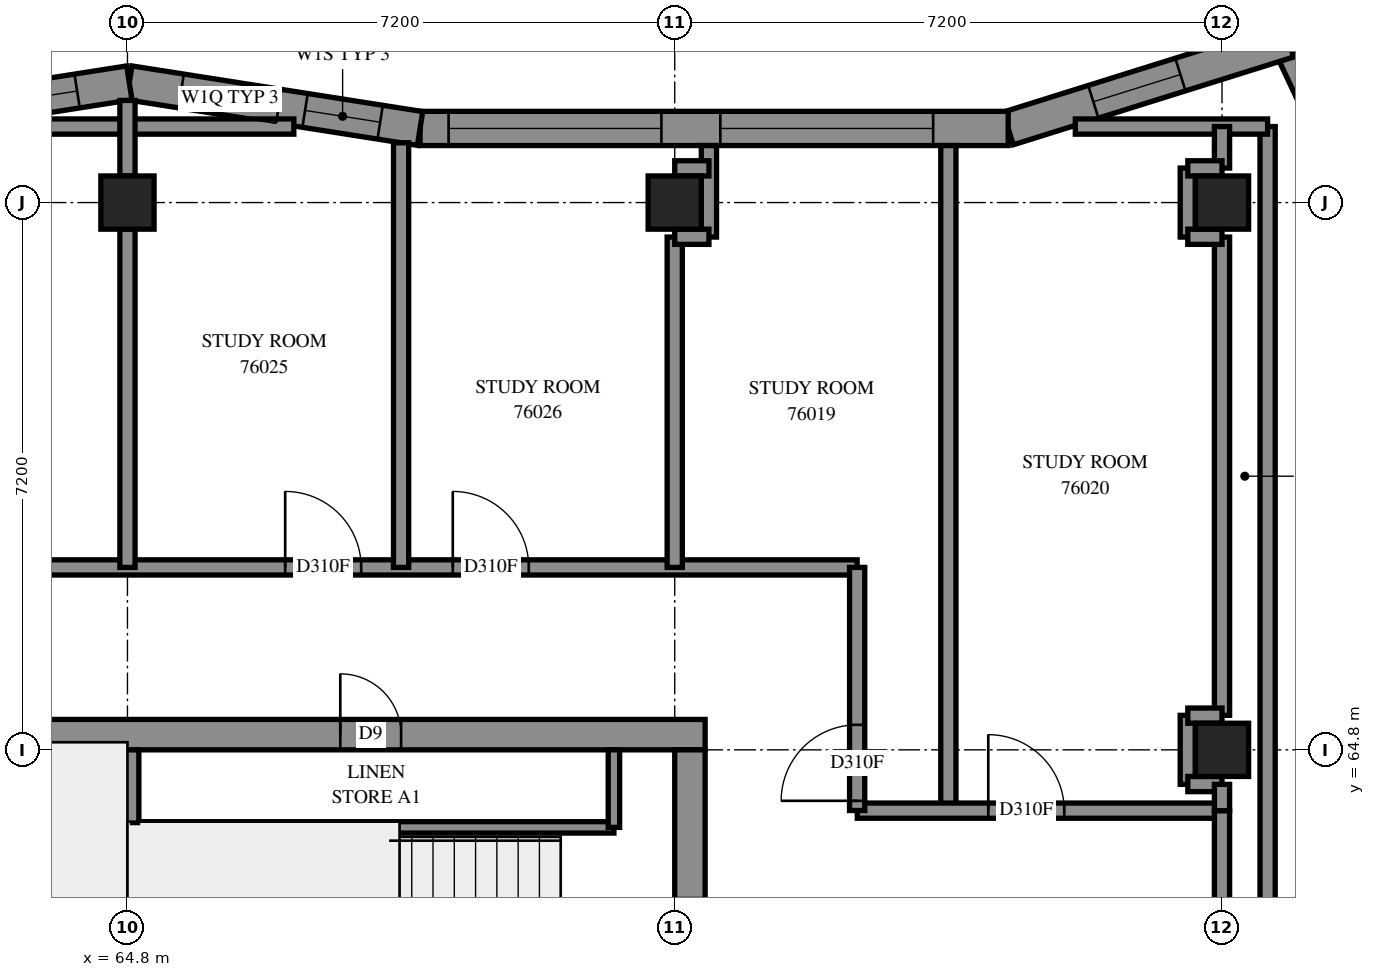
"""IFC4 building model, lengths in metres.
Left out: names, types, materials, properties, quantities, classifications, styles, units other than length and angle.
Written with IfcOpenShell. Run it as: python <this file> out.ifc"""

import sys

from ifc_helpers import new_model, si_unit, direction, frame, frame_2d, origin, origin_2d, place, context, subcontext, project, spatial, polyline, rectangle, outline, extrude, element, fill, save


model = new_model("IFC4")
c1 = context("Model", 3, precision=1e-05, world=origin(), true_north=direction((0.0, 1.0)))
c2 = subcontext(c1, "Body", "Model", "MODEL_VIEW")
j1 = project(units=[si_unit("LENGTHUNIT", "METRE"), si_unit("PLANEANGLEUNIT", "RADIAN")], contexts=[c1])
p1 = place(None, origin())
s1 = spatial("IfcSite", under=j1, at=p1, CompositionType="ELEMENT")
p2 = place(p1, origin())
s2 = spatial("IfcBuilding", under=s1, at=p2, CompositionType="ELEMENT")
p3 = place(p2, frame((0.0, 0.0, 277.8)))
s3 = spatial("IfcBuildingStorey", under=s2, at=p3, CompositionType="ELEMENT", Elevation=277.8)
for number, where, z_axis, x_axis in (
    (1, (64.8, 72.0, 0.0), (0.0, 0.0, 1.0), (1.0, 0.0, 0.0)),
    (2, (72.0, 72.0, 0.0), (0.0, 0.0, 1.0), (1.0, 0.0, 0.0)),
    (3, (79.2, 64.8, 0.0), (0.0, 0.0, 1.0), (1.0, 0.0, 0.0)),
    (4, (79.2, 72.0, 0.0), (0.0, 0.0, 1.0), (1.0, 0.0, 0.0)),
):
    element("IfcColumn", number, at=place(p3, frame(where, z_axis=z_axis, x_axis=x_axis)), inside=s3, PredefinedType="COLUMN", context=c2, shape_type="SweptSolid", body=[
        extrude(rectangle(XDim=0.7, YDim=0.7, at=origin_2d()), origin(), (0.0, 0.0, 1.0), 3.1),
    ])
p4 = place(p3, frame((57.2, 65.0, -0.3), z_axis=(0.0, 0.0, 1.0), x_axis=(1.0, 0.0, 0.0)))
e5 = element("IfcWall", 5, at=p4, inside=s3, PredefinedType="SHEAR", context=c2, shape_type="SweptSolid", body=[
    extrude(rectangle(XDim=15.2, YDim=0.4, at=frame_2d((7.6, 0.0))), origin(), (0.0, 0.0, 1.0), 2.7),
])
p5 = place(p4, frame((10.4, 0.0, 0.3)))
e6 = element("IfcOpeningElement", 6, at=p5, cuts=e5, PredefinedType="OPENING", context=c2, shape_type="SweptSolid", body=[
    extrude(rectangle(XDim=0.8, YDim=2.1, at=frame_2d((0.4, 1.05))), frame((0.0, 0.21, 0.0), z_axis=(0.0, -1.0, 0.0), x_axis=(1.0, 0.0, 0.0)), (0.0, 0.0, 1.0), 0.42),
])
p6 = place(p3, frame((72.2, 50.4, -0.3), z_axis=(0.0, 0.0, 1.0), x_axis=(0.0, 1.0, 0.0)))
e7 = element("IfcWall", 7, at=p6, inside=s3, PredefinedType="SHEAR", context=c2, shape_type="SweptSolid", body=[
    extrude(rectangle(XDim=14.4, YDim=0.4, at=frame_2d((7.2, 0.0))), origin(), (0.0, 0.0, 1.0), 2.7),
])
p7 = place(p6, frame((4.55, 0.0, 0.3)))
e8 = element("IfcOpeningElement", 8, at=p7, cuts=e7, PredefinedType="OPENING", context=c2, shape_type="SweptSolid", body=[
    extrude(rectangle(XDim=1.1, YDim=2.1, at=frame_2d((0.55, 1.05))), frame((0.0, 0.21, 0.0), z_axis=(0.0, -1.0, 0.0), x_axis=(1.0, 0.0, 0.0)), (0.0, 0.0, 1.0), 0.42),
])
p8 = place(p6, frame((11.35, 0.0, 0.3)))
e9 = element("IfcOpeningElement", 9, at=p8, cuts=e7, PredefinedType="OPENING", context=c2, shape_type="SweptSolid", body=[
    extrude(rectangle(XDim=1.1, YDim=2.1, at=frame_2d((0.55, 1.05))), frame((0.0, 0.21, 0.0), z_axis=(0.0, -1.0, 0.0), x_axis=(1.0, 0.0, 0.0)), (0.0, 0.0, 1.0), 0.42),
])
p9 = place(p3, frame((64.8, 60.6, 0.0), z_axis=(0.0, 0.0, 1.0), x_axis=(0.0, 1.0, 0.0)))
e10 = element("IfcWall", 10, at=p9, inside=s3, PredefinedType="SOLIDWALL", context=c2, shape_type="SweptSolid", body=[
    extrude(rectangle(XDim=4.2, YDim=0.3, at=frame_2d((2.1, 0.0))), origin(), (0.0, 0.0, 1.0), 3.1),
])
p10 = place(p3, frame((81.528, 71.04, 0.0), z_axis=(0.0, 0.0, 1.0), x_axis=(-0.4256305639, 0.9048970234, 0.0)))
e11 = element("IfcWall", 11, at=p10, inside=s3, PredefinedType="SOLIDWALL", context=c2, shape_type="SweptSolid", body=[
    extrude(outline(polyline([(0.06, -0.225), (3.61, -0.225), (3.217, 0.225), (-0.06, 0.225), (0.06, -0.225)])), origin(), (0.0, 0.0, 1.0), 3.1),
])
p11 = place(p10, frame((0.736, 0.0, 0.45)))
e12 = element("IfcOpeningElement", 12, at=p11, cuts=e11, PredefinedType="OPENING", context=c2, shape_type="SweptSolid", body=[
    extrude(rectangle(XDim=1.2, YDim=2.55, at=frame_2d((0.6, 1.275))), frame((0.0, 0.235, 0.0), z_axis=(0.0, -1.0, 0.0), x_axis=(1.0, 0.0, 0.0)), (0.0, 0.0, 1.0), 0.47),
])
p12 = place(p3, frame((80.075, 74.13, 0.0), z_axis=(0.0, 0.0, 1.0), x_axis=(-0.9543297625, -0.2987552583, 0.0)))
e13 = element("IfcWall", 13, at=p12, inside=s3, PredefinedType="SOLIDWALL", context=c2, shape_type="SweptSolid", body=[
    extrude(outline(polyline([(-0.196, -0.225), (3.83, -0.225), (3.899, 0.225), (0.196, 0.225), (-0.196, -0.225)])), origin(), (0.0, 0.0, 1.0), 3.1),
])
p13 = place(p12, frame((1.491, 0.0, 0.45)))
e14 = element("IfcOpeningElement", 14, at=p13, cuts=e13, PredefinedType="OPENING", context=c2, shape_type="SweptSolid", body=[
    extrude(rectangle(XDim=1.2, YDim=2.55, at=frame_2d((0.6, 1.275))), frame((0.0, 0.235, 0.0), z_axis=(0.0, -1.0, 0.0), x_axis=(1.0, 0.0, 0.0)), (0.0, 0.0, 1.0), 0.47),
])
p14 = place(p3, frame((76.387, 72.975, 0.0), z_axis=(0.0, 0.0, 1.0), x_axis=(-1.0, 0.0, 0.0)))
e15 = element("IfcWall", 15, at=p14, inside=s3, PredefinedType="SOLIDWALL", context=c2, shape_type="SweptSolid", body=[
    extrude(outline(polyline([(0.034, -0.225), (7.72, -0.225), (7.755, 0.225), (-0.034, 0.225), (0.034, -0.225)])), origin(), (0.0, 0.0, 1.0), 3.1),
])
p15 = place(p14, frame((0.987, 0.0, 0.45)))
e16 = element("IfcOpeningElement", 16, at=p15, cuts=e15, PredefinedType="OPENING", context=c2, shape_type="SweptSolid", body=[
    extrude(rectangle(XDim=2.8, YDim=2.55, at=frame_2d((1.4, 1.275))), frame((0.0, 0.235, 0.0), z_axis=(0.0, -1.0, 0.0), x_axis=(1.0, 0.0, 0.0)), (0.0, 0.0, 1.0), 0.47),
])
p16 = place(p14, frame((4.562, 0.0, 0.45)))
e17 = element("IfcOpeningElement", 17, at=p16, cuts=e15, PredefinedType="OPENING", context=c2, shape_type="SweptSolid", body=[
    extrude(rectangle(XDim=2.8, YDim=2.55, at=frame_2d((1.4, 1.275))), frame((0.0, 0.235, 0.0), z_axis=(0.0, -1.0, 0.0), x_axis=(1.0, 0.0, 0.0)), (0.0, 0.0, 1.0), 0.47),
])
p17 = place(p3, frame((68.65, 72.975, 0.0), z_axis=(0.0, 0.0, 1.0), x_axis=(-0.9879128581, 0.1550102733, 0.0)))
e18 = element("IfcWall", 18, at=p17, inside=s3, PredefinedType="SOLIDWALL", context=c2, shape_type="SweptSolid", body=[
    extrude(outline(polyline([(0.018, -0.225), (3.907, -0.225), (3.837, 0.225), (-0.018, 0.225), (0.018, -0.225)])), origin(), (0.0, 0.0, 1.0), 3.1),
])
p18 = place(p17, frame((0.531, 0.0, 0.45)))
e19 = element("IfcOpeningElement", 19, at=p18, cuts=e18, PredefinedType="OPENING", context=c2, shape_type="SweptSolid", body=[
    extrude(rectangle(XDim=1.0, YDim=2.5, at=frame_2d((0.5, 1.25))), frame((0.0, 0.235, 0.0), z_axis=(0.0, -1.0, 0.0), x_axis=(1.0, 0.0, 0.0)), (0.0, 0.0, 1.0), 0.47),
])
p19 = place(p17, frame((1.881, 0.0, 0.45)))
e20 = element("IfcOpeningElement", 20, at=p19, cuts=e18, PredefinedType="OPENING", context=c2, shape_type="SweptSolid", body=[
    extrude(rectangle(XDim=1.3, YDim=2.5, at=frame_2d((0.65, 1.25))), frame((0.0, 0.235, 0.0), z_axis=(0.0, -1.0, 0.0), x_axis=(1.0, 0.0, 0.0)), (0.0, 0.0, 1.0), 0.47),
])
p20 = place(p3, frame((64.824, 73.575, 0.0), z_axis=(0.0, 0.0, 1.0), x_axis=(-0.9879107269, -0.1550238552, 0.0)))
e21 = element("IfcWall", 21, at=p20, inside=s3, PredefinedType="SOLIDWALL", context=c2, shape_type="SweptSolid", body=[
    extrude(outline(polyline([(-0.035, -0.225), (3.854, -0.225), (3.925, 0.225), (0.035, 0.225), (-0.035, -0.225)])), origin(), (0.0, 0.0, 1.0), 3.1),
])
p21 = place(p20, frame((0.695, 0.0, 0.45)))
e22 = element("IfcOpeningElement", 22, at=p21, cuts=e21, PredefinedType="OPENING", context=c2, shape_type="SweptSolid", body=[
    extrude(rectangle(XDim=1.3, YDim=2.5, at=frame_2d((0.65, 1.25))), frame((0.0, 0.235, 0.0), z_axis=(0.0, -1.0, 0.0), x_axis=(1.0, 0.0, 0.0)), (0.0, 0.0, 1.0), 0.47),
])
p22 = place(p20, frame((2.345, 0.0, 0.45)))
e23 = element("IfcOpeningElement", 23, at=p22, cuts=e21, PredefinedType="OPENING", context=c2, shape_type="SweptSolid", body=[
    extrude(rectangle(XDim=1.0, YDim=2.5, at=frame_2d((0.5, 1.25))), frame((0.0, 0.235, 0.0), z_axis=(0.0, -1.0, 0.0), x_axis=(1.0, 0.0, 0.0)), (0.0, 0.0, 1.0), 0.47),
])
p23 = place(p3, frame((64.95, 63.78, 0.0), z_axis=(0.0, 0.0, 1.0), x_axis=(1.0, 0.0, 0.0)))
e24 = element("IfcWall", 24, at=p23, inside=s3, PredefinedType="PARTITIONING", context=c2, shape_type="SweptSolid", body=[
    extrude(rectangle(XDim=6.25, YDim=0.15, at=frame_2d((3.125, 0.0))), origin(), (0.0, 0.0, 1.0), 3.1),
])
p24 = place(p3, frame((71.2, 63.78, 0.0), z_axis=(0.0, 0.0, 1.0), x_axis=(0.0, 1.0, 0.0)))
e25 = element("IfcWall", 25, at=p24, inside=s3, PredefinedType="PARTITIONING", context=c2, shape_type="SweptSolid", body=[
    extrude(rectangle(XDim=1.02, YDim=0.15, at=frame_2d((0.51, 0.0))), origin(), (0.0, 0.0, 1.0), 3.1),
])
p25 = place(p3, frame((55.2, 67.2, 0.0), z_axis=(0.0, 0.0, 1.0), x_axis=(1.0, 0.0, 0.0)))
e26 = element("IfcWall", 26, at=p25, inside=s3, PredefinedType="PARTITIONING", context=c2, shape_type="SweptSolid", body=[
    extrude(rectangle(XDim=19.2, YDim=0.2, at=frame_2d((9.6, 0.0))), origin(), (0.0, 0.0, 1.0), 3.1),
])
p26 = place(p25, frame((6.261, 0.0, 0.0)))
e27 = element("IfcOpeningElement", 27, at=p26, cuts=e26, PredefinedType="OPENING", context=c2, shape_type="SweptSolid", body=[
    extrude(rectangle(XDim=0.9, YDim=2.1, at=frame_2d((0.45, 1.05))), frame((0.0, 0.11, 0.0), z_axis=(0.0, -1.0, 0.0), x_axis=(1.0, 0.0, 0.0)), (0.0, 0.0, 1.0), 0.22),
])
p27 = place(p25, frame((11.675, 0.0, 0.0)))
e28 = element("IfcOpeningElement", 28, at=p27, cuts=e26, PredefinedType="OPENING", context=c2, shape_type="SweptSolid", body=[
    extrude(rectangle(XDim=1.0, YDim=2.1, at=frame_2d((0.5, 1.05))), frame((0.0, 0.11, 0.0), z_axis=(0.0, -1.0, 0.0), x_axis=(1.0, 0.0, 0.0)), (0.0, 0.0, 1.0), 0.22),
])
p28 = place(p25, frame((13.88, 0.0, 0.0)))
e29 = element("IfcOpeningElement", 29, at=p28, cuts=e26, PredefinedType="OPENING", context=c2, shape_type="SweptSolid", body=[
    extrude(rectangle(XDim=1.0, YDim=2.1, at=frame_2d((0.5, 1.05))), frame((0.0, 0.11, 0.0), z_axis=(0.0, -1.0, 0.0), x_axis=(1.0, 0.0, 0.0)), (0.0, 0.0, 1.0), 0.22),
])
p29 = place(p3, frame((79.8, 59.2, 0.0), z_axis=(0.0, 0.0, 1.0), x_axis=(0.0, 1.0, 0.0)))
e30 = element("IfcWall", 30, at=p29, inside=s3, PredefinedType="PARTITIONING", context=c2, shape_type="SweptSolid", body=[
    extrude(rectangle(XDim=13.8, YDim=0.2, at=frame_2d((6.9, 0.0))), origin(), (0.0, 0.0, 1.0), 3.1),
])
p30 = place(p3, frame((75.6, 64.0, 0.0), z_axis=(0.0, 0.0, 1.0), x_axis=(0.0, 1.0, 0.0)))
e31 = element("IfcWall", 31, at=p30, inside=s3, PredefinedType="PARTITIONING", context=c2, shape_type="SweptSolid", body=[
    extrude(rectangle(XDim=8.75, YDim=0.2, at=frame_2d((4.375, 0.0))), origin(), (0.0, 0.0, 1.0), 3.1),
])
p31 = place(p3, frame((79.2, 65.254, 0.0), z_axis=(0.0, 0.0, 1.0), x_axis=(0.0, 1.0, 0.0)))
e32 = element("IfcWall", 32, at=p31, inside=s3, PredefinedType="PARTITIONING", context=c2, shape_type="SweptSolid", body=[
    extrude(rectangle(XDim=6.292, YDim=0.2, at=frame_2d((3.146, 0.0))), origin(), (0.0, 0.0, 1.0), 3.1),
])
p32 = place(p3, frame((68.4, 67.2, 0.0), z_axis=(0.0, 0.0, 1.0), x_axis=(0.0, 1.0, 0.0)))
e33 = element("IfcWall", 33, at=p32, inside=s3, PredefinedType="PARTITIONING", context=c2, shape_type="SweptSolid", body=[
    extrude(rectangle(XDim=5.586, YDim=0.2, at=frame_2d((2.793, 0.0))), origin(), (0.0, 0.0, 1.0), 3.1),
])
p33 = place(p3, frame((74.402, 64.0, 0.0), z_axis=(0.0, 0.0, 1.0), x_axis=(1.0, 0.0, 0.0)))
e34 = element("IfcWall", 34, at=p33, inside=s3, PredefinedType="PARTITIONING", context=c2, shape_type="SweptSolid", body=[
    extrude(rectangle(XDim=4.798, YDim=0.2, at=frame_2d((2.399, 0.0))), origin(), (0.0, 0.0, 1.0), 3.1),
])
p34 = place(p33, frame((1.723, 0.0, 0.0)))
e35 = element("IfcOpeningElement", 35, at=p34, cuts=e34, PredefinedType="OPENING", context=c2, shape_type="SweptSolid", body=[
    extrude(rectangle(XDim=1.0, YDim=2.1, at=frame_2d((0.5, 1.05))), frame((0.0, 0.11, 0.0), z_axis=(0.0, -1.0, 0.0), x_axis=(1.0, 0.0, 0.0)), (0.0, 0.0, 1.0), 0.22),
])
p35 = place(p3, frame((64.8, 67.2, 0.0), z_axis=(0.0, 0.0, 1.0), x_axis=(0.0, 1.0, 0.0)))
e36 = element("IfcWall", 36, at=p35, inside=s3, PredefinedType="PARTITIONING", context=c2, shape_type="SweptSolid", body=[
    extrude(rectangle(XDim=4.45, YDim=0.2, at=frame_2d((2.225, 0.0))), origin(), (0.0, 0.0, 1.0), 3.1),
])
p36 = place(p3, frame((72.0, 67.2, 0.0), z_axis=(0.0, 0.0, 1.0), x_axis=(0.0, 1.0, 0.0)))
e37 = element("IfcWall", 37, at=p36, inside=s3, PredefinedType="PARTITIONING", context=c2, shape_type="SweptSolid", body=[
    extrude(rectangle(XDim=4.346, YDim=0.2, at=frame_2d((2.173, 0.0))), origin(), (0.0, 0.0, 1.0), 3.1),
])
p37 = place(p3, frame((62.66, 73.0, 0.0), z_axis=(0.0, 0.0, 1.0), x_axis=(1.0, 0.0, 0.0)))
e38 = element("IfcWall", 38, at=p37, inside=s3, PredefinedType="PARTITIONING", context=c2, shape_type="SweptSolid", body=[
    extrude(rectangle(XDim=4.329, YDim=0.2, at=frame_2d((2.164, 0.0))), origin(), (0.0, 0.0, 1.0), 3.1),
])
p38 = place(p3, frame((74.4, 64.002, 0.0), z_axis=(0.0, 0.0, 1.0), x_axis=(0.0, 1.0, 0.0)))
e39 = element("IfcWall", 39, at=p38, inside=s3, PredefinedType="PARTITIONING", context=c2, shape_type="SweptSolid", body=[
    extrude(rectangle(XDim=3.198, YDim=0.2, at=frame_2d((1.599, 0.0))), origin(), (0.0, 0.0, 1.0), 3.1),
])
p39 = place(p38, frame((0.127, 0.0, 0.0)))
e40 = element("IfcOpeningElement", 40, at=p39, cuts=e39, PredefinedType="OPENING", context=c2, shape_type="SweptSolid", body=[
    extrude(rectangle(XDim=1.0, YDim=2.1, at=frame_2d((0.5, 1.05))), frame((0.0, 0.11, 0.0), z_axis=(0.0, -1.0, 0.0), x_axis=(1.0, 0.0, 0.0)), (0.0, 0.0, 1.0), 0.22),
])
p40 = place(p3, frame((77.27, 73.0, 0.0), z_axis=(0.0, 0.0, 1.0), x_axis=(1.0, 0.0, 0.0)))
e41 = element("IfcWall", 41, at=p40, inside=s3, PredefinedType="PARTITIONING", context=c2, shape_type="SweptSolid", body=[
    extrude(rectangle(XDim=2.53, YDim=0.2, at=frame_2d((1.265, 0.0))), origin(), (0.0, 0.0, 1.0), 3.1),
])
p41 = place(p3, frame((79.2, 62.0, 0.0), z_axis=(0.0, 0.0, 1.0), x_axis=(0.0, 1.0, 0.0)))
e42 = element("IfcWall", 42, at=p41, inside=s3, PredefinedType="PARTITIONING", context=c2, shape_type="SweptSolid", body=[
    extrude(rectangle(XDim=2.0, YDim=0.2, at=frame_2d((1.0, 0.0))), origin(), (0.0, 0.0, 1.0), 3.1),
])
p42 = place(p3, frame((78.75, 64.346, 0.0), z_axis=(0.0, 0.0, 1.0), x_axis=(0.0, 1.0, 0.0)))
e43 = element("IfcWall", 43, at=p42, inside=s3, PredefinedType="PARTITIONING", context=c2, shape_type="SweptSolid", body=[
    extrude(rectangle(XDim=0.908, YDim=0.2, at=frame_2d((0.454, 0.0))), origin(), (0.0, 0.0, 1.0), 3.1),
])
p43 = place(p3, frame((72.45, 71.546, 0.0), z_axis=(0.0, 0.0, 1.0), x_axis=(0.0, 1.0, 0.0)))
e44 = element("IfcWall", 44, at=p43, inside=s3, PredefinedType="PARTITIONING", context=c2, shape_type="SweptSolid", body=[
    extrude(rectangle(XDim=1.204, YDim=0.2, at=frame_2d((0.602, 0.0))), origin(), (0.0, 0.0, 1.0), 3.1),
])
p44 = place(p3, frame((78.75, 71.546, 0.0), z_axis=(0.0, 0.0, 1.0), x_axis=(0.0, 1.0, 0.0)))
e45 = element("IfcWall", 45, at=p44, inside=s3, PredefinedType="PARTITIONING", context=c2, shape_type="SweptSolid", body=[
    extrude(rectangle(XDim=0.908, YDim=0.2, at=frame_2d((0.454, 0.0))), origin(), (0.0, 0.0, 1.0), 3.1),
])
p45 = place(p3, frame((64.8, 72.35, 0.0), z_axis=(0.0, 0.0, 1.0), x_axis=(0.0, 1.0, 0.0)))
e46 = element("IfcWall", 46, at=p45, inside=s3, PredefinedType="PARTITIONING", context=c2, shape_type="SweptSolid", body=[
    extrude(rectangle(XDim=0.994, YDim=0.2, at=frame_2d((0.497, 0.0))), origin(), (0.0, 0.0, 1.0), 3.1),
])
p46 = place(p3, frame((79.2, 72.454, 0.0), z_axis=(0.0, 0.0, 1.0), x_axis=(0.0, 1.0, 0.0)))
e47 = element("IfcWall", 47, at=p46, inside=s3, PredefinedType="PARTITIONING", context=c2, shape_type="SweptSolid", body=[
    extrude(rectangle(XDim=0.546, YDim=0.2, at=frame_2d((0.273, 0.0))), origin(), (0.0, 0.0, 1.0), 3.1),
])
for number, where, z_axis, x_axis in (
    (48, (72.0, 71.55, 0.0), (0.0, 0.0, 1.0), (1.0, 0.0, 0.0)),
    (49, (78.75, 71.55, 0.0), (0.0, 0.0, 1.0), (1.0, 0.0, 0.0)),
    (50, (72.0, 72.45, 0.0), (0.0, 0.0, 1.0), (1.0, 0.0, 0.0)),
    (51, (78.75, 72.45, 0.0), (0.0, 0.0, 1.0), (1.0, 0.0, 0.0)),
    (52, (78.75, 65.25, 0.0), (0.0, 0.0, 1.0), (1.0, 0.0, 0.0)),
    (53, (78.75, 64.35, 0.0), (0.0, 0.0, 1.0), (1.0, 0.0, 0.0)),
):
    element("IfcWall", number, at=place(p3, frame(where, z_axis=z_axis, x_axis=x_axis)), inside=s3, PredefinedType="PARTITIONING", context=c2, shape_type="SweptSolid", body=[
        extrude(rectangle(XDim=0.45, YDim=0.2, at=frame_2d((0.225, 0.0))), origin(), (0.0, 0.0, 1.0), 3.1),
    ])
p47 = place(p3, frame((79.2, 64.0, 0.0), z_axis=(0.0, 0.0, 1.0), x_axis=(0.0, 1.0, 0.0)))
e54 = element("IfcWall", 54, at=p47, inside=s3, PredefinedType="PARTITIONING", context=c2, shape_type="SweptSolid", body=[
    extrude(rectangle(XDim=0.346, YDim=0.2, at=frame_2d((0.173, 0.0))), origin(), (0.0, 0.0, 1.0), 3.1),
])
p48 = place(p13, origin())
e55 = element("IfcWindow", 55, at=p48, inside=s3, PartitioningType="SINGLE_PANEL", PredefinedType="WINDOW", context=c2, shape_type="SweptSolid", body=[
    extrude(rectangle(XDim=1.2, YDim=2.55, at=frame_2d((0.6, 1.275))), frame((0.0, 0.205, 0.0), z_axis=(0.0, -1.0, 0.0), x_axis=(1.0, 0.0, 0.0)), (0.0, 0.0, 1.0), 0.06),
])
fill(e14, e55)
p49 = place(p15, origin())
e56 = element("IfcWindow", 56, at=p49, inside=s3, PartitioningType="SINGLE_PANEL", PredefinedType="WINDOW", context=c2, shape_type="SweptSolid", body=[
    extrude(rectangle(XDim=2.8, YDim=2.55, at=frame_2d((1.4, 1.275))), frame((0.0, 0.205, 0.0), z_axis=(0.0, -1.0, 0.0), x_axis=(1.0, 0.0, 0.0)), (0.0, 0.0, 1.0), 0.06),
])
fill(e16, e56)
p50 = place(p16, origin())
e57 = element("IfcWindow", 57, at=p50, inside=s3, PartitioningType="SINGLE_PANEL", PredefinedType="WINDOW", context=c2, shape_type="SweptSolid", body=[
    extrude(rectangle(XDim=2.8, YDim=2.55, at=frame_2d((1.4, 1.275))), frame((0.0, 0.205, 0.0), z_axis=(0.0, -1.0, 0.0), x_axis=(1.0, 0.0, 0.0)), (0.0, 0.0, 1.0), 0.06),
])
fill(e17, e57)
p51 = place(p5, origin())
e58 = element("IfcDoor", 58, at=p51, inside=s3, OperationType="SINGLE_SWING_RIGHT", PredefinedType="DOOR", context=c2, shape_type="SweptSolid", body=[
    extrude(rectangle(XDim=0.8, YDim=2.1, at=frame_2d((0.4, 1.05))), frame((0.0, 0.025, 0.0), z_axis=(0.0, -1.0, 0.0), x_axis=(1.0, 0.0, 0.0)), (0.0, 0.0, 1.0), 0.05),
])
fill(e6, e58)
p52 = place(p39, origin())
e59 = element("IfcDoor", 59, at=p52, inside=s3, OperationType="SINGLE_SWING_RIGHT", PredefinedType="DOOR", context=c2, shape_type="SweptSolid", body=[
    extrude(rectangle(XDim=1.0, YDim=2.1, at=frame_2d((0.5, 1.05))), frame((0.0, 0.025, 0.0), z_axis=(0.0, -1.0, 0.0), x_axis=(1.0, 0.0, 0.0)), (0.0, 0.0, 1.0), 0.05),
])
fill(e40, e59)
p53 = place(p34, origin())
e60 = element("IfcDoor", 60, at=p53, inside=s3, OperationType="SINGLE_SWING_LEFT", PredefinedType="DOOR", context=c2, shape_type="SweptSolid", body=[
    extrude(rectangle(XDim=1.0, YDim=2.1, at=frame_2d((0.5, 1.05))), frame((0.0, 0.025, 0.0), z_axis=(0.0, -1.0, 0.0), x_axis=(1.0, 0.0, 0.0)), (0.0, 0.0, 1.0), 0.05),
])
fill(e35, e60)
p54 = place(p27, origin())
e61 = element("IfcDoor", 61, at=p54, inside=s3, OperationType="SINGLE_SWING_RIGHT", PredefinedType="DOOR", context=c2, shape_type="SweptSolid", body=[
    extrude(rectangle(XDim=1.0, YDim=2.1, at=frame_2d((0.5, 1.05))), frame((0.0, 0.025, 0.0), z_axis=(0.0, -1.0, 0.0), x_axis=(1.0, 0.0, 0.0)), (0.0, 0.0, 1.0), 0.05),
])
fill(e28, e61)
p55 = place(p28, origin())
e62 = element("IfcDoor", 62, at=p55, inside=s3, OperationType="SINGLE_SWING_LEFT", PredefinedType="DOOR", context=c2, shape_type="SweptSolid", body=[
    extrude(rectangle(XDim=1.0, YDim=2.1, at=frame_2d((0.5, 1.05))), frame((0.0, 0.025, 0.0), z_axis=(0.0, -1.0, 0.0), x_axis=(1.0, 0.0, 0.0)), (0.0, 0.0, 1.0), 0.05),
])
fill(e29, e62)
p56 = place(p18, origin())
e63 = element("IfcWindow", 63, at=p56, inside=s3, PartitioningType="SINGLE_PANEL", PredefinedType="WINDOW", context=c2, shape_type="SweptSolid", body=[
    extrude(rectangle(XDim=1.0, YDim=2.5, at=frame_2d((0.5, 1.25))), frame((0.0, 0.205, 0.0), z_axis=(0.0, -1.0, 0.0), x_axis=(1.0, 0.0, 0.0)), (0.0, 0.0, 1.0), 0.06),
])
fill(e19, e63)
p57 = place(p19, origin())
e64 = element("IfcWindow", 64, at=p57, inside=s3, PartitioningType="SINGLE_PANEL", PredefinedType="WINDOW", context=c2, shape_type="SweptSolid", body=[
    extrude(rectangle(XDim=1.3, YDim=2.5, at=frame_2d((0.65, 1.25))), frame((0.0, 0.135, 0.0), z_axis=(0.0, -1.0, 0.0), x_axis=(1.0, 0.0, 0.0)), (0.0, 0.0, 1.0), 0.06),
])
fill(e20, e64)
p58 = place(p21, origin())
e65 = element("IfcWindow", 65, at=p58, inside=s3, PartitioningType="SINGLE_PANEL", PredefinedType="WINDOW", context=c2, shape_type="SweptSolid", body=[
    extrude(rectangle(XDim=1.3, YDim=2.5, at=frame_2d((0.65, 1.25))), frame((0.0, 0.135, 0.0), z_axis=(0.0, -1.0, 0.0), x_axis=(1.0, 0.0, 0.0)), (0.0, 0.0, 1.0), 0.06),
])
fill(e22, e65)
save(model, sys.argv[1])
